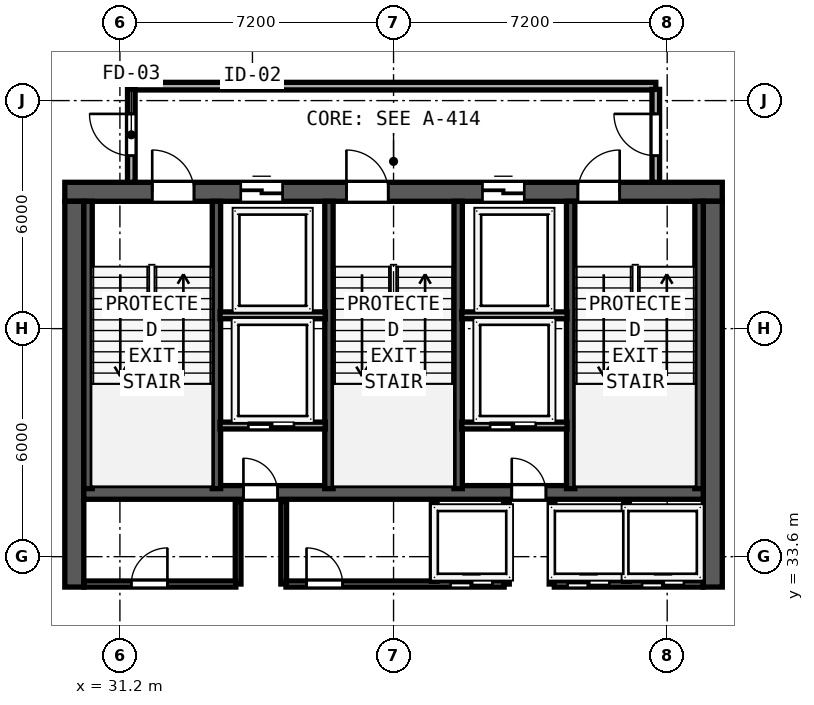
"""IFC4 building model, lengths in metres.
Left out: names, types, materials, properties, quantities, classifications, styles, units other than length and angle.
Written with IfcOpenShell. Run it as: python <this file> out.ifc"""

import sys

from ifc_helpers import new_model, si_unit, direction, frame, frame_2d, origin, place, context, subcontext, project, spatial, rectangle, extrude, element, fill, save


model = new_model("IFC4")
c1 = context("Model", 3, precision=1e-05, world=origin(), true_north=direction((0.0, 1.0)))
c2 = subcontext(c1, "Body", "Model", "MODEL_VIEW")
j1 = project(units=[si_unit("LENGTHUNIT", "METRE"), si_unit("PLANEANGLEUNIT", "RADIAN")], contexts=[c1])
p1 = place(None, origin())
s1 = spatial("IfcSite", under=j1, at=p1, CompositionType="ELEMENT")
p2 = place(p1, origin())
s2 = spatial("IfcBuilding", under=s1, at=p2, CompositionType="ELEMENT")
p3 = place(p2, frame((0.0, 0.0, 293.9)))
s3 = spatial("IfcBuildingStorey", under=s2, at=p3, CompositionType="ELEMENT", Elevation=293.9)
p4 = place(p3, frame((29.75, 43.2, 0.0), z_axis=(0.0, 0.0, 1.0), x_axis=(1.0, 0.0, 0.0)))
e1 = element("IfcWall", 1, at=p4, inside=s3, PredefinedType="SHEAR", context=c2, shape_type="SweptSolid", body=[
    extrude(rectangle(XDim=17.3, YDim=0.5, at=frame_2d((8.65, 0.0))), origin(), (0.0, 0.0, 1.0), 3.72),
])
p5 = place(p4, frame((2.3, 0.0, 0.0)))
e2 = element("IfcOpeningElement", 2, at=p5, cuts=e1, PredefinedType="OPENING", context=c2, shape_type="SweptSolid", body=[
    extrude(rectangle(XDim=1.1, YDim=2.15, at=frame_2d((0.55, 1.075))), frame((0.0, 0.26, 0.0), z_axis=(0.0, -1.0, 0.0), x_axis=(1.0, 0.0, 0.0)), (0.0, 0.0, 1.0), 0.52),
])
p6 = place(p4, frame((7.41, 0.0, 0.0)))
e3 = element("IfcOpeningElement", 3, at=p6, cuts=e1, PredefinedType="OPENING", context=c2, shape_type="SweptSolid", body=[
    extrude(rectangle(XDim=1.1, YDim=2.15, at=frame_2d((0.55, 1.075))), frame((0.0, 0.26, 0.0), z_axis=(0.0, -1.0, 0.0), x_axis=(1.0, 0.0, 0.0)), (0.0, 0.0, 1.0), 0.52),
])
p7 = place(p4, frame((13.5, 0.0, 0.0)))
e4 = element("IfcOpeningElement", 4, at=p7, cuts=e1, PredefinedType="OPENING", context=c2, shape_type="SweptSolid", body=[
    extrude(rectangle(XDim=1.1, YDim=2.15, at=frame_2d((0.55, 1.075))), frame((0.0, 0.26, 0.0), z_axis=(0.0, -1.0, 0.0), x_axis=(1.0, 0.0, 0.0)), (0.0, 0.0, 1.0), 0.52),
])
p8 = place(p4, frame((4.63, 0.0, 0.0)))
e5 = element("IfcOpeningElement", 5, at=p8, cuts=e1, PredefinedType="OPENING", context=c2, shape_type="SweptSolid", body=[
    extrude(rectangle(XDim=1.1, YDim=2.2, at=frame_2d((0.55, 1.1))), frame((0.0, 0.26, 0.0), z_axis=(0.0, -1.0, 0.0), x_axis=(1.0, 0.0, 0.0)), (0.0, 0.0, 1.0), 0.52),
])
p9 = place(p4, frame((10.99, 0.0, 0.0)))
e6 = element("IfcOpeningElement", 6, at=p9, cuts=e1, PredefinedType="OPENING", context=c2, shape_type="SweptSolid", body=[
    extrude(rectangle(XDim=1.1, YDim=2.2, at=frame_2d((0.55, 1.1))), frame((0.0, 0.26, 0.0), z_axis=(0.0, -1.0, 0.0), x_axis=(1.0, 0.0, 0.0)), (0.0, 0.0, 1.0), 0.52),
])
for number, where, z_axis, x_axis in (
    (7, (30.0, 32.8, 0.0), (0.0, 0.0, 1.0), (0.0, 1.0, 0.0)),
    (8, (46.8, 32.8, 0.0), (0.0, 0.0, 1.0), (0.0, 1.0, 0.0)),
):
    element("IfcWall", number, at=place(p3, frame(where, z_axis=z_axis, x_axis=x_axis)), inside=s3, PredefinedType="SHEAR", context=c2, shape_type="SweptSolid", body=[
        extrude(rectangle(XDim=10.15, YDim=0.5, at=frame_2d((5.075, 0.0))), origin(), (0.0, 0.0, 1.0), 3.72),
    ])
p10 = place(p3, frame((30.25, 35.29, 0.0), z_axis=(0.0, 0.0, 1.0), x_axis=(1.0, 0.0, 0.0)))
e9 = element("IfcWall", 9, at=p10, inside=s3, PredefinedType="SHEAR", context=c2, shape_type="SweptSolid", body=[
    extrude(rectangle(XDim=16.3, YDim=0.36, at=frame_2d((8.15, 0.0))), origin(), (0.0, 0.0, 1.0), 3.72),
])
p11 = place(p10, frame((5.1, 0.0, 0.0), z_axis=(0.0, 0.0, 1.0), x_axis=(-1.0, 0.0, 0.0)))
e10 = element("IfcOpeningElement", 10, at=p11, cuts=e9, PredefinedType="OPENING", context=c2, shape_type="SweptSolid", body=[
    extrude(rectangle(XDim=0.9, YDim=2.1, at=frame_2d((0.45, 1.05))), frame((0.0, 0.19, 0.0), z_axis=(0.0, -1.0, 0.0), x_axis=(1.0, 0.0, 0.0)), (0.0, 0.0, 1.0), 0.38),
])
p12 = place(p10, frame((12.16, 0.0, 0.0), z_axis=(0.0, 0.0, 1.0), x_axis=(-1.0, 0.0, 0.0)))
e11 = element("IfcOpeningElement", 11, at=p12, cuts=e9, PredefinedType="OPENING", context=c2, shape_type="SweptSolid", body=[
    extrude(rectangle(XDim=0.9, YDim=2.1, at=frame_2d((0.45, 1.05))), frame((0.0, 0.19, 0.0), z_axis=(0.0, -1.0, 0.0), x_axis=(1.0, 0.0, 0.0)), (0.0, 0.0, 1.0), 0.38),
])
for number, where, z_axis, x_axis in (
    (12, (30.362, 35.39, 0.0), (0.0, 0.0, 1.0), (0.0, 1.0, 0.0)),
    (13, (33.74, 35.39, 0.0), (0.0, 0.0, 1.0), (0.0, 1.0, 0.0)),
    (14, (36.7, 35.39, 0.0), (0.0, 0.0, 1.0), (0.0, 1.0, 0.0)),
    (15, (40.1, 35.39, 0.0), (0.0, 0.0, 1.0), (0.0, 1.0, 0.0)),
    (16, (43.06, 35.39, 0.0), (0.0, 0.0, 1.0), (0.0, 1.0, 0.0)),
    (17, (46.438, 35.39, 0.0), (0.0, 0.0, 1.0), (0.0, 1.0, 0.0)),
):
    element("IfcWall", number, at=place(p3, frame(where, z_axis=z_axis, x_axis=x_axis)), inside=s3, PredefinedType="SHEAR", context=c2, shape_type="SweptSolid", body=[
        extrude(rectangle(XDim=7.56, YDim=0.22, at=frame_2d((3.78, 0.0))), origin(), (0.0, 0.0, 1.0), 3.72),
    ])
p13 = place(p3, frame((31.5, 45.98, 0.0), z_axis=(0.0, 0.0, 1.0), x_axis=(1.0, 0.0, 0.0)))
e18 = element("IfcWall", 18, at=p13, inside=s3, PredefinedType="SOLIDWALL", context=c2, shape_type="SweptSolid", body=[
    extrude(rectangle(XDim=13.8, YDim=0.2, at=frame_2d((6.9, 0.0))), origin(), (0.0, 0.0, 1.0), 3.72),
])
p14 = place(p3, frame((31.5, 43.45, 0.0), z_axis=(0.0, 0.0, 1.0), x_axis=(0.0, 1.0, 0.0)))
e19 = element("IfcWall", 19, at=p14, inside=s3, PredefinedType="SOLIDWALL", context=c2, shape_type="SweptSolid", body=[
    extrude(rectangle(XDim=2.445, YDim=0.2, at=frame_2d((1.223, 0.0))), origin(), (0.0, 0.0, 1.0), 3.72),
])
p15 = place(p14, frame((1.8, 0.0, 0.0), z_axis=(0.0, 0.0, 1.0), x_axis=(-1.0, 0.0, 0.0)))
e20 = element("IfcOpeningElement", 20, at=p15, cuts=e19, PredefinedType="OPENING", context=c2, shape_type="SweptSolid", body=[
    extrude(rectangle(XDim=1.1, YDim=2.15, at=frame_2d((0.55, 1.075))), frame((0.0, 0.11, 0.0), z_axis=(0.0, -1.0, 0.0), x_axis=(1.0, 0.0, 0.0)), (0.0, 0.0, 1.0), 0.22),
])
p16 = place(p3, frame((45.3, 43.45, 0.0), z_axis=(0.0, 0.0, 1.0), x_axis=(0.0, 1.0, 0.0)))
e21 = element("IfcWall", 21, at=p16, inside=s3, PredefinedType="SOLIDWALL", context=c2, shape_type="SweptSolid", body=[
    extrude(rectangle(XDim=2.445, YDim=0.2, at=frame_2d((1.223, 0.0))), origin(), (0.0, 0.0, 1.0), 3.72),
])
p17 = place(p16, frame((0.7, 0.0, 0.0)))
e22 = element("IfcOpeningElement", 22, at=p17, cuts=e21, PredefinedType="OPENING", context=c2, shape_type="SweptSolid", body=[
    extrude(rectangle(XDim=1.1, YDim=2.15, at=frame_2d((0.55, 1.075))), frame((0.0, 0.11, 0.0), z_axis=(0.0, -1.0, 0.0), x_axis=(1.0, 0.0, 0.0)), (0.0, 0.0, 1.0), 0.22),
])
for number, where, z_axis, x_axis in (
    (23, (33.835, 39.95, 0.0), (0.0, 0.0, 1.0), (1.0, 0.0, 0.0)),
    (24, (40.195, 39.95, 0.0), (0.0, 0.0, 1.0), (1.0, 0.0, 0.0)),
):
    element("IfcWall", number, at=place(p3, frame(where, z_axis=z_axis, x_axis=x_axis)), inside=s3, PredefinedType="SOLIDWALL", context=c2, shape_type="SweptSolid", body=[
        extrude(rectangle(XDim=2.77, YDim=0.18, at=frame_2d((1.385, 0.0))), origin(), (0.0, 0.0, 1.0), 3.72),
    ])
p18 = place(p3, frame((33.835, 37.05, 0.0), z_axis=(0.0, 0.0, 1.0), x_axis=(1.0, 0.0, 0.0)))
e25 = element("IfcWall", 25, at=p18, inside=s3, PredefinedType="SOLIDWALL", context=c2, shape_type="SweptSolid", body=[
    extrude(rectangle(XDim=2.77, YDim=0.18, at=frame_2d((1.385, 0.0))), origin(), (0.0, 0.0, 1.0), 3.72),
])
p19 = place(p18, frame((1.945, 0.0, 0.0), z_axis=(0.0, 0.0, 1.0), x_axis=(-1.0, 0.0, 0.0)))
e26 = element("IfcOpeningElement", 26, at=p19, cuts=e25, PredefinedType="OPENING", context=c2, shape_type="SweptSolid", body=[
    extrude(rectangle(XDim=1.2, YDim=2.2, at=frame_2d((0.6, 1.1))), frame((0.0, 0.1, 0.0), z_axis=(0.0, -1.0, 0.0), x_axis=(1.0, 0.0, 0.0)), (0.0, 0.0, 1.0), 0.2),
])
for number, where, z_axis, x_axis in (
    (27, (34.31, 32.88, 0.0), (0.0, 0.0, 1.0), (0.0, 1.0, 0.0)),
    (28, (35.51, 32.88, 0.0), (0.0, 0.0, 1.0), (0.0, 1.0, 0.0)),
):
    element("IfcWall", number, at=place(p3, frame(where, z_axis=z_axis, x_axis=x_axis)), inside=s3, PredefinedType="SOLIDWALL", context=c2, shape_type="SweptSolid", body=[
        extrude(rectangle(XDim=2.17, YDim=0.15, at=frame_2d((1.085, 0.0))), origin(), (0.0, 0.0, 1.0), 3.72),
    ])
p20 = place(p3, frame((40.195, 37.05, 0.0), z_axis=(0.0, 0.0, 1.0), x_axis=(1.0, 0.0, 0.0)))
e29 = element("IfcWall", 29, at=p20, inside=s3, PredefinedType="SOLIDWALL", context=c2, shape_type="SweptSolid", body=[
    extrude(rectangle(XDim=2.77, YDim=0.18, at=frame_2d((1.385, 0.0))), origin(), (0.0, 0.0, 1.0), 3.72),
])
p21 = place(p20, frame((1.945, 0.0, 0.0), z_axis=(0.0, 0.0, 1.0), x_axis=(-1.0, 0.0, 0.0)))
e30 = element("IfcOpeningElement", 30, at=p21, cuts=e29, PredefinedType="OPENING", context=c2, shape_type="SweptSolid", body=[
    extrude(rectangle(XDim=1.2, YDim=2.2, at=frame_2d((0.6, 1.1))), frame((0.0, 0.1, 0.0), z_axis=(0.0, -1.0, 0.0), x_axis=(1.0, 0.0, 0.0)), (0.0, 0.0, 1.0), 0.2),
])
for number, where, z_axis, x_axis in (
    (31, (41.37, 32.88, 0.0), (0.0, 0.0, 1.0), (0.0, 1.0, 0.0)),
    (32, (42.57, 32.88, 0.0), (0.0, 0.0, 1.0), (0.0, 1.0, 0.0)),
):
    element("IfcWall", number, at=place(p3, frame(where, z_axis=z_axis, x_axis=x_axis)), inside=s3, PredefinedType="SOLIDWALL", context=c2, shape_type="SweptSolid", body=[
        extrude(rectangle(XDim=2.17, YDim=0.15, at=frame_2d((1.085, 0.0))), origin(), (0.0, 0.0, 1.0), 3.72),
    ])
p22 = place(p3, frame((30.25, 32.88, 0.0), z_axis=(0.0, 0.0, 1.0), x_axis=(1.0, 0.0, 0.0)))
e33 = element("IfcWall", 33, at=p22, inside=s3, PredefinedType="SOLIDWALL", context=c2, shape_type="SweptSolid", body=[
    extrude(rectangle(XDim=4.0, YDim=0.16, at=frame_2d((2.0, 0.0))), origin(), (0.0, 0.0, 1.0), 3.72),
])
p23 = place(p22, frame((2.2, 0.0, 0.0), z_axis=(0.0, 0.0, 1.0), x_axis=(-1.0, 0.0, 0.0)))
e34 = element("IfcOpeningElement", 34, at=p23, cuts=e33, PredefinedType="OPENING", context=c2, shape_type="SweptSolid", body=[
    extrude(rectangle(XDim=0.95, YDim=2.12, at=frame_2d((0.475, 1.06))), frame((0.0, 0.09, 0.0), z_axis=(0.0, -1.0, 0.0), x_axis=(1.0, 0.0, 0.0)), (0.0, 0.0, 1.0), 0.18),
])
p24 = place(p3, frame((35.57, 32.88, 0.0), z_axis=(0.0, 0.0, 1.0), x_axis=(1.0, 0.0, 0.0)))
e35 = element("IfcWall", 35, at=p24, inside=s3, PredefinedType="SOLIDWALL", context=c2, shape_type="SweptSolid", body=[
    extrude(rectangle(XDim=5.74, YDim=0.16, at=frame_2d((2.87, 0.0))), origin(), (0.0, 0.0, 1.0), 3.72),
])
p25 = place(p24, frame((1.49, 0.0, 0.0), z_axis=(0.0, 0.0, 1.0), x_axis=(-1.0, 0.0, 0.0)))
e36 = element("IfcOpeningElement", 36, at=p25, cuts=e35, PredefinedType="OPENING", context=c2, shape_type="SweptSolid", body=[
    extrude(rectangle(XDim=0.95, YDim=2.12, at=frame_2d((0.475, 1.06))), frame((0.0, 0.09, 0.0), z_axis=(0.0, -1.0, 0.0), x_axis=(1.0, 0.0, 0.0)), (0.0, 0.0, 1.0), 0.18),
])
p26 = place(p24, frame((5.43, 0.0, 0.0), z_axis=(0.0, 0.0, 1.0), x_axis=(-1.0, 0.0, 0.0)))
e37 = element("IfcOpeningElement", 37, at=p26, cuts=e35, PredefinedType="OPENING", context=c2, shape_type="SweptSolid", body=[
    extrude(rectangle(XDim=1.1, YDim=2.2, at=frame_2d((0.55, 1.1))), frame((0.0, 0.09, 0.0), z_axis=(0.0, -1.0, 0.0), x_axis=(1.0, 0.0, 0.0)), (0.0, 0.0, 1.0), 0.18),
])
p27 = place(p3, frame((42.63, 32.88, 0.0), z_axis=(0.0, 0.0, 1.0), x_axis=(1.0, 0.0, 0.0)))
e38 = element("IfcWall", 38, at=p27, inside=s3, PredefinedType="SOLIDWALL", context=c2, shape_type="SweptSolid", body=[
    extrude(rectangle(XDim=3.92, YDim=0.16, at=frame_2d((1.96, 0.0))), origin(), (0.0, 0.0, 1.0), 3.72),
])
p28 = place(p27, frame((1.45, 0.0, 0.0), z_axis=(0.0, 0.0, 1.0), x_axis=(-1.0, 0.0, 0.0)))
e39 = element("IfcOpeningElement", 39, at=p28, cuts=e38, PredefinedType="OPENING", context=c2, shape_type="SweptSolid", body=[
    extrude(rectangle(XDim=1.1, YDim=2.2, at=frame_2d((0.55, 1.1))), frame((0.0, 0.09, 0.0), z_axis=(0.0, -1.0, 0.0), x_axis=(1.0, 0.0, 0.0)), (0.0, 0.0, 1.0), 0.18),
])
p29 = place(p27, frame((3.41, 0.0, 0.0), z_axis=(0.0, 0.0, 1.0), x_axis=(-1.0, 0.0, 0.0)))
e40 = element("IfcOpeningElement", 40, at=p29, cuts=e38, PredefinedType="OPENING", context=c2, shape_type="SweptSolid", body=[
    extrude(rectangle(XDim=1.1, YDim=2.2, at=frame_2d((0.55, 1.1))), frame((0.0, 0.09, 0.0), z_axis=(0.0, -1.0, 0.0), x_axis=(1.0, 0.0, 0.0)), (0.0, 0.0, 1.0), 0.18),
])
for number, where, z_axis, x_axis in (
    (41, (39.47, 32.95, 0.0), (0.0, 0.0, 1.0), (0.0, 1.0, 0.0)),
    (42, (44.53, 32.95, 0.0), (0.0, 0.0, 1.0), (0.0, 1.0, 0.0)),
):
    element("IfcWall", number, at=place(p3, frame(where, z_axis=z_axis, x_axis=x_axis)), inside=s3, PredefinedType="SOLIDWALL", context=c2, shape_type="SweptSolid", body=[
        extrude(rectangle(XDim=2.05, YDim=0.15, at=frame_2d((1.025, 0.0))), origin(), (0.0, 0.0, 1.0), 3.72),
    ])
p30 = place(p5, origin())
e43 = element("IfcDoor", 43, at=p30, inside=s3, OperationType="SINGLE_SWING_LEFT", PredefinedType="DOOR", context=c2, shape_type="SweptSolid", body=[
    extrude(rectangle(XDim=1.1, YDim=2.15, at=frame_2d((0.55, 1.075))), frame((0.0, 0.185, 0.0), z_axis=(0.0, -1.0, 0.0), x_axis=(1.0, 0.0, 0.0)), (0.0, 0.0, 1.0), 0.05),
])
fill(e2, e43)
p31 = place(p6, origin())
e44 = element("IfcDoor", 44, at=p31, inside=s3, OperationType="SINGLE_SWING_LEFT", PredefinedType="DOOR", context=c2, shape_type="SweptSolid", body=[
    extrude(rectangle(XDim=1.1, YDim=2.15, at=frame_2d((0.55, 1.075))), frame((0.0, 0.185, 0.0), z_axis=(0.0, -1.0, 0.0), x_axis=(1.0, 0.0, 0.0)), (0.0, 0.0, 1.0), 0.05),
])
fill(e3, e44)
p32 = place(p7, origin())
e45 = element("IfcDoor", 45, at=p32, inside=s3, OperationType="SINGLE_SWING_RIGHT", PredefinedType="DOOR", context=c2, shape_type="SweptSolid", body=[
    extrude(rectangle(XDim=1.1, YDim=2.15, at=frame_2d((0.55, 1.075))), frame((0.0, 0.185, 0.0), z_axis=(0.0, -1.0, 0.0), x_axis=(1.0, 0.0, 0.0)), (0.0, 0.0, 1.0), 0.05),
])
fill(e4, e45)
p33 = place(p15, origin())
e46 = element("IfcDoor", 46, at=p33, inside=s3, OperationType="SINGLE_SWING_LEFT", PredefinedType="DOOR", context=c2, shape_type="SweptSolid", body=[
    extrude(rectangle(XDim=1.1, YDim=2.15, at=frame_2d((0.55, 1.075))), frame((0.0, 0.025, 0.0), z_axis=(0.0, -1.0, 0.0), x_axis=(1.0, 0.0, 0.0)), (0.0, 0.0, 1.0), 0.05),
])
fill(e20, e46)
p34 = place(p17, origin())
e47 = element("IfcDoor", 47, at=p34, inside=s3, OperationType="SINGLE_SWING_RIGHT", PredefinedType="DOOR", context=c2, shape_type="SweptSolid", body=[
    extrude(rectangle(XDim=1.1, YDim=2.15, at=frame_2d((0.55, 1.075))), frame((0.0, 0.025, 0.0), z_axis=(0.0, -1.0, 0.0), x_axis=(1.0, 0.0, 0.0)), (0.0, 0.0, 1.0), 0.05),
])
fill(e22, e47)
p35 = place(p8, origin())
e48 = element("IfcDoor", 48, at=p35, inside=s3, OperationType="SLIDING_TO_LEFT", PredefinedType="DOOR", context=c2, shape_type="SweptSolid", body=[
    extrude(rectangle(XDim=1.1, YDim=2.2, at=frame_2d((0.55, 1.1))), frame((0.0, 0.185, 0.0), z_axis=(0.0, -1.0, 0.0), x_axis=(1.0, 0.0, 0.0)), (0.0, 0.0, 1.0), 0.05),
])
fill(e5, e48)
p36 = place(p9, origin())
e49 = element("IfcDoor", 49, at=p36, inside=s3, OperationType="SLIDING_TO_LEFT", PredefinedType="DOOR", context=c2, shape_type="SweptSolid", body=[
    extrude(rectangle(XDim=1.1, YDim=2.2, at=frame_2d((0.55, 1.1))), frame((0.0, 0.185, 0.0), z_axis=(0.0, -1.0, 0.0), x_axis=(1.0, 0.0, 0.0)), (0.0, 0.0, 1.0), 0.05),
])
fill(e6, e49)
p37 = place(p19, origin())
e50 = element("IfcDoor", 50, at=p37, inside=s3, OperationType="SLIDING_TO_RIGHT", PredefinedType="DOOR", context=c2, shape_type="SweptSolid", body=[
    extrude(rectangle(XDim=1.2, YDim=2.2, at=frame_2d((0.6, 1.1))), frame((0.0, 0.025, 0.0), z_axis=(0.0, -1.0, 0.0), x_axis=(1.0, 0.0, 0.0)), (0.0, 0.0, 1.0), 0.05),
])
fill(e26, e50)
p38 = place(p11, origin())
e51 = element("IfcDoor", 51, at=p38, inside=s3, OperationType="SINGLE_SWING_RIGHT", PredefinedType="DOOR", context=c2, shape_type="SweptSolid", body=[
    extrude(rectangle(XDim=0.9, YDim=2.1, at=frame_2d((0.45, 1.05))), frame((0.0, 0.025, 0.0), z_axis=(0.0, -1.0, 0.0), x_axis=(1.0, 0.0, 0.0)), (0.0, 0.0, 1.0), 0.05),
])
fill(e10, e51)
p39 = place(p21, origin())
e52 = element("IfcDoor", 52, at=p39, inside=s3, OperationType="SLIDING_TO_RIGHT", PredefinedType="DOOR", context=c2, shape_type="SweptSolid", body=[
    extrude(rectangle(XDim=1.2, YDim=2.2, at=frame_2d((0.6, 1.1))), frame((0.0, 0.025, 0.0), z_axis=(0.0, -1.0, 0.0), x_axis=(1.0, 0.0, 0.0)), (0.0, 0.0, 1.0), 0.05),
])
fill(e30, e52)
p40 = place(p12, origin())
e53 = element("IfcDoor", 53, at=p40, inside=s3, OperationType="SINGLE_SWING_RIGHT", PredefinedType="DOOR", context=c2, shape_type="SweptSolid", body=[
    extrude(rectangle(XDim=0.9, YDim=2.1, at=frame_2d((0.45, 1.05))), frame((0.0, 0.025, 0.0), z_axis=(0.0, -1.0, 0.0), x_axis=(1.0, 0.0, 0.0)), (0.0, 0.0, 1.0), 0.05),
])
fill(e11, e53)
p41 = place(p23, origin())
e54 = element("IfcDoor", 54, at=p41, inside=s3, OperationType="SINGLE_SWING_LEFT", PredefinedType="DOOR", context=c2, shape_type="SweptSolid", body=[
    extrude(rectangle(XDim=0.95, YDim=2.12, at=frame_2d((0.475, 1.06))), frame((0.0, 0.025, 0.0), z_axis=(0.0, -1.0, 0.0), x_axis=(1.0, 0.0, 0.0)), (0.0, 0.0, 1.0), 0.05),
])
fill(e34, e54)
p42 = place(p25, origin())
e55 = element("IfcDoor", 55, at=p42, inside=s3, OperationType="SINGLE_SWING_RIGHT", PredefinedType="DOOR", context=c2, shape_type="SweptSolid", body=[
    extrude(rectangle(XDim=0.95, YDim=2.12, at=frame_2d((0.475, 1.06))), frame((0.0, 0.025, 0.0), z_axis=(0.0, -1.0, 0.0), x_axis=(1.0, 0.0, 0.0)), (0.0, 0.0, 1.0), 0.05),
])
fill(e36, e55)
p43 = place(p26, origin())
e56 = element("IfcDoor", 56, at=p43, inside=s3, OperationType="SLIDING_TO_RIGHT", PredefinedType="DOOR", context=c2, shape_type="SweptSolid", body=[
    extrude(rectangle(XDim=1.1, YDim=2.2, at=frame_2d((0.55, 1.1))), frame((0.0, 0.025, 0.0), z_axis=(0.0, -1.0, 0.0), x_axis=(1.0, 0.0, 0.0)), (0.0, 0.0, 1.0), 0.05),
])
fill(e37, e56)
p44 = place(p28, origin())
e57 = element("IfcDoor", 57, at=p44, inside=s3, OperationType="SLIDING_TO_RIGHT", PredefinedType="DOOR", context=c2, shape_type="SweptSolid", body=[
    extrude(rectangle(XDim=1.1, YDim=2.2, at=frame_2d((0.55, 1.1))), frame((0.0, 0.025, 0.0), z_axis=(0.0, -1.0, 0.0), x_axis=(1.0, 0.0, 0.0)), (0.0, 0.0, 1.0), 0.05),
])
fill(e39, e57)
p45 = place(p29, origin())
e58 = element("IfcDoor", 58, at=p45, inside=s3, OperationType="SLIDING_TO_RIGHT", PredefinedType="DOOR", context=c2, shape_type="SweptSolid", body=[
    extrude(rectangle(XDim=1.1, YDim=2.2, at=frame_2d((0.55, 1.1))), frame((0.0, 0.025, 0.0), z_axis=(0.0, -1.0, 0.0), x_axis=(1.0, 0.0, 0.0)), (0.0, 0.0, 1.0), 0.05),
])
fill(e40, e58)
save(model, sys.argv[1])
